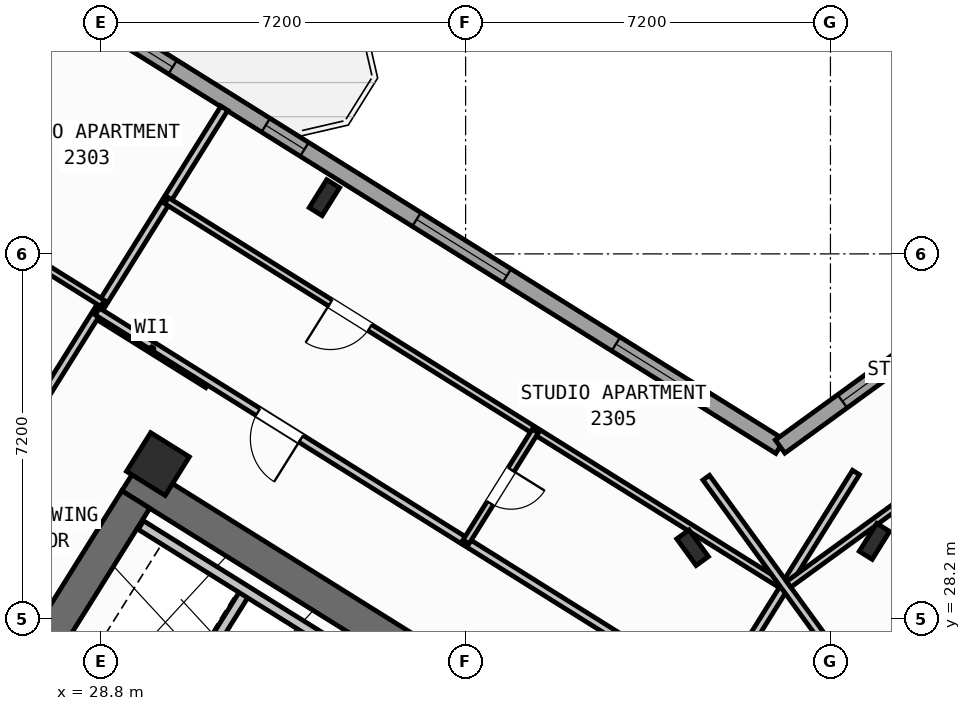
"""IFC4 building model, lengths in metres.
Left out: names, types, materials, properties, quantities, classifications, styles, units other than length and angle.
Written with IfcOpenShell. Run it as: python <this file> out.ifc"""

import sys

from ifc_helpers import new_model, si_unit, direction, frame, frame_2d, origin, origin_2d, place, context, subcontext, project, spatial, rectangle, hollow_rectangle, i_section, extrude, source, transform, mapped, element, fill, save


model = new_model("IFC4")
c1 = context("Model", 3, precision=1e-05, world=origin(), true_north=direction((0.0, 1.0)))
c2 = subcontext(c1, "Body", "Model", "MODEL_VIEW")
j1 = project(units=[si_unit("LENGTHUNIT", "METRE"), si_unit("PLANEANGLEUNIT", "RADIAN")], contexts=[c1])
p1 = place(None, origin())
s1 = spatial("IfcSite", under=j1, at=p1, CompositionType="ELEMENT")
p2 = place(p1, origin())
s2 = spatial("IfcBuilding", under=s1, at=p2, CompositionType="ELEMENT")
p3 = place(p2, frame((0.0, 0.0, 93.6)))
s3 = spatial("IfcBuildingStorey", under=s2, at=p3, CompositionType="ELEMENT", Elevation=93.6)
p4 = place(p3, frame((40.615, 23.983, 0.0), z_axis=(0.0, 0.0, 1.0), x_axis=(-0.848045953968, 0.529922692436, 0.0)))
e1 = element("IfcWall", 1, at=p4, inside=s3, PredefinedType="SHEAR", context=c2, shape_type="SweptSolid", body=[
    extrude(rectangle(XDim=13.24, YDim=0.65, at=frame_2d((6.62, 0.0))), origin(), (0.0, 0.0, 1.0), 3.35),
])
p5 = place(p3, frame((29.491, 30.552, 0.0), z_axis=(0.0, 0.0, 1.0), x_axis=(-0.529893103397, -0.8480644427, 0.0)))
e2 = element("IfcWall", 2, at=p5, inside=s3, PredefinedType="SHEAR", context=c2, shape_type="SweptSolid", body=[
    extrude(rectangle(XDim=3.525, YDim=0.65, at=frame_2d((1.763, 0.0))), origin(), (0.0, 0.0, 1.0), 3.35),
])
p6 = place(p3, frame((44.325, 24.113, 0.0), z_axis=(0.0, 0.0, 1.0), x_axis=(0.809012664862, 0.58779121131, 0.0)))
e3 = element("IfcWall", 3, at=p6, inside=s3, PredefinedType="SHEAR", context=c2, shape_type="SweptSolid", body=[
    extrude(rectangle(XDim=12.44, YDim=0.65, at=frame_2d((6.22, 0.0))), origin(), (0.0, 0.0, 1.0), 3.35),
])
m1 = source(origin(), c2, "Body", "SweptSolid", [
    extrude(i_section(OverallWidth=0.3, OverallDepth=0.65, WebThickness=0.016, FlangeThickness=0.031, at=origin_2d()), origin(), (0.0, 0.0, 1.0), 3.6),
])
for number, where, z_axis, x_axis in (
    (4, (44.068, 29.726, 0.0), (0.0, 0.0, 1.0), (-0.848, 0.53, 0.0)),
    (5, (33.213, 36.509, 0.0), (0.0, 0.0, 1.0), (-0.848, 0.53, 0.0)),
):
    element("IfcColumn", number, at=place(p3, frame(where, z_axis=z_axis, x_axis=x_axis)), inside=s3, PredefinedType="COLUMN", context=c2, shape_type="MappedRepresentation", body=[
        mapped(m1, transform((0.0, 0.0, 0.0), scale=1.0)),
    ])
m2 = source(origin(), c2, "Body", "SweptSolid", [
    extrude(hollow_rectangle(XDim=0.9, YDim=0.9, WallThickness=0.036, at=origin_2d()), origin(), (0.0, 0.0, 1.0), 3.6),
])
p7 = place(p3, frame((29.928, 31.251, 0.0), z_axis=(0.0, 0.0, 1.0), x_axis=(-0.848048096156, 0.529919264233, 0.0)))
e6 = element("IfcColumn", 6, at=p7, inside=s3, PredefinedType="COLUMN", context=c2, shape_type="MappedRepresentation", body=[
    mapped(m2, transform((0.0, 0.0, 0.0), scale=1.0)),
])
p8 = place(p3, frame((40.479, 29.601, 0.0), z_axis=(0.0, 0.0, 1.0), x_axis=(0.809016994375, 0.587785252292, 0.0)))
e7 = element("IfcColumn", 7, at=p8, inside=s3, PredefinedType="COLUMN", context=c2, shape_type="MappedRepresentation", body=[
    mapped(m1, transform((0.0, 0.0, 0.0), scale=1.0)),
])
p9 = place(p3, frame((31.76, 12.183, 0.0), z_axis=(0.0, 0.0, 1.0), x_axis=(-0.848047074256, 0.529920899612, 0.0)))
e8 = element("IfcWall", 8, at=p9, inside=s3, PredefinedType="STANDARD", context=c2, shape_type="SweptSolid", body=[
    extrude(rectangle(XDim=30.652, YDim=0.32, at=frame_2d((15.326, 0.0))), origin(), (0.0, 0.0, 1.0), 3.35),
])
p10 = place(p9, frame((15.153, 0.0, 0.0)))
e9 = element("IfcOpeningElement", 9, at=p10, cuts=e8, PredefinedType="OPENING", context=c2, shape_type="SweptSolid", body=[
    extrude(rectangle(XDim=1.2, YDim=2.15, at=frame_2d((0.6, 1.075))), frame((0.0, 0.17, 0.0), z_axis=(0.0, -1.0, 0.0), x_axis=(1.0, 0.0, 0.0)), (0.0, 0.0, 1.0), 0.34),
])
p11 = place(p9, frame((2.002, 0.0, 0.8)))
e10 = element("IfcOpeningElement", 10, at=p11, cuts=e8, PredefinedType="OPENING", context=c2, shape_type="SweptSolid", body=[
    extrude(rectangle(XDim=2.1, YDim=1.55, at=frame_2d((1.05, 0.775))), frame((0.0, 0.17, 0.0), z_axis=(0.0, -1.0, 0.0), x_axis=(1.0, 0.0, 0.0)), (0.0, 0.0, 1.0), 0.34),
])
p12 = place(p9, frame((7.206, 0.0, 0.8)))
e11 = element("IfcOpeningElement", 11, at=p12, cuts=e8, PredefinedType="OPENING", context=c2, shape_type="SweptSolid", body=[
    extrude(rectangle(XDim=2.1, YDim=1.55, at=frame_2d((1.05, 0.775))), frame((0.0, 0.17, 0.0), z_axis=(0.0, -1.0, 0.0), x_axis=(1.0, 0.0, 0.0)), (0.0, 0.0, 1.0), 0.34),
])
p13 = place(p9, frame((12.648, 0.0, 1.0)))
e12 = element("IfcOpeningElement", 12, at=p13, cuts=e8, PredefinedType="OPENING", context=c2, shape_type="SweptSolid", body=[
    extrude(rectangle(XDim=0.9, YDim=1.25, at=frame_2d((0.45, 0.625))), frame((0.0, 0.17, 0.0), z_axis=(0.0, -1.0, 0.0), x_axis=(1.0, 0.0, 0.0)), (0.0, 0.0, 1.0), 0.34),
])
p14 = place(p9, frame((27.974, 0.0, 0.95)))
e13 = element("IfcOpeningElement", 13, at=p14, cuts=e8, PredefinedType="OPENING", context=c2, shape_type="SweptSolid", body=[
    extrude(rectangle(XDim=1.2, YDim=1.4, at=frame_2d((0.6, 0.7))), frame((0.0, 0.17, 0.0), z_axis=(0.0, -1.0, 0.0), x_axis=(1.0, 0.0, 0.0)), (0.0, 0.0, 1.0), 0.34),
])
p15 = place(p9, frame((18.347, 0.0, 1.0)))
e14 = element("IfcOpeningElement", 14, at=p15, cuts=e8, PredefinedType="OPENING", context=c2, shape_type="SweptSolid", body=[
    extrude(rectangle(XDim=0.9, YDim=1.25, at=frame_2d((0.45, 0.625))), frame((0.0, 0.17, 0.0), z_axis=(0.0, -1.0, 0.0), x_axis=(1.0, 0.0, 0.0)), (0.0, 0.0, 1.0), 0.34),
])
p16 = place(p9, frame((20.931, 0.0, 1.0)))
e15 = element("IfcOpeningElement", 15, at=p16, cuts=e8, PredefinedType="OPENING", context=c2, shape_type="SweptSolid", body=[
    extrude(rectangle(XDim=0.65, YDim=1.15, at=frame_2d((0.325, 0.575))), frame((0.0, 0.17, 0.0), z_axis=(0.0, -1.0, 0.0), x_axis=(1.0, 0.0, 0.0)), (0.0, 0.0, 1.0), 0.34),
])
p17 = place(p9, frame((22.938, 0.0, 1.0)))
e16 = element("IfcOpeningElement", 16, at=p17, cuts=e8, PredefinedType="OPENING", context=c2, shape_type="SweptSolid", body=[
    extrude(rectangle(XDim=0.9, YDim=1.25, at=frame_2d((0.45, 0.625))), frame((0.0, 0.17, 0.0), z_axis=(0.0, -1.0, 0.0), x_axis=(1.0, 0.0, 0.0)), (0.0, 0.0, 1.0), 0.34),
])
p18 = place(p9, frame((25.069, 0.0, 1.0)))
e17 = element("IfcOpeningElement", 17, at=p18, cuts=e8, PredefinedType="OPENING", context=c2, shape_type="SweptSolid", body=[
    extrude(rectangle(XDim=0.9, YDim=1.25, at=frame_2d((0.45, 0.625))), frame((0.0, 0.17, 0.0), z_axis=(0.0, -1.0, 0.0), x_axis=(1.0, 0.0, 0.0)), (0.0, 0.0, 1.0), 0.34),
])
p19 = place(p3, frame((17.424, 47.083, 0.0), z_axis=(0.0, 0.0, 1.0), x_axis=(0.848049927979, -0.529916332693, 0.0)))
e18 = element("IfcWall", 18, at=p19, inside=s3, PredefinedType="STANDARD", context=c2, shape_type="SweptSolid", body=[
    extrude(rectangle(XDim=29.223, YDim=0.32, at=frame_2d((14.612, 0.0))), origin(), (0.0, 0.0, 1.0), 3.35),
])
p20 = place(p19, frame((3.745, 0.0, 0.0)))
e19 = element("IfcOpeningElement", 19, at=p20, cuts=e18, PredefinedType="OPENING", context=c2, shape_type="SweptSolid", body=[
    extrude(rectangle(XDim=1.05, YDim=2.15, at=frame_2d((0.525, 1.075))), frame((0.0, 0.17, 0.0), z_axis=(0.0, -1.0, 0.0), x_axis=(1.0, 0.0, 0.0)), (0.0, 0.0, 1.0), 0.34),
])
p21 = place(p19, frame((0.699, 0.0, 0.95)))
e20 = element("IfcOpeningElement", 20, at=p21, cuts=e18, PredefinedType="OPENING", context=c2, shape_type="SweptSolid", body=[
    extrude(rectangle(XDim=1.2, YDim=1.4, at=frame_2d((0.6, 0.7))), frame((0.0, 0.17, 0.0), z_axis=(0.0, -1.0, 0.0), x_axis=(1.0, 0.0, 0.0)), (0.0, 0.0, 1.0), 0.34),
])
p22 = place(p19, frame((6.951, 0.0, 1.0)))
e21 = element("IfcOpeningElement", 21, at=p22, cuts=e18, PredefinedType="OPENING", context=c2, shape_type="SweptSolid", body=[
    extrude(rectangle(XDim=0.9, YDim=1.25, at=frame_2d((0.45, 0.625))), frame((0.0, 0.17, 0.0), z_axis=(0.0, -1.0, 0.0), x_axis=(1.0, 0.0, 0.0)), (0.0, 0.0, 1.0), 0.34),
])
p23 = place(p19, frame((9.841, 0.0, 0.85)))
e22 = element("IfcOpeningElement", 22, at=p23, cuts=e18, PredefinedType="OPENING", context=c2, shape_type="SweptSolid", body=[
    extrude(rectangle(XDim=1.5, YDim=1.5, at=frame_2d((0.75, 0.75))), frame((0.0, 0.17, 0.0), z_axis=(0.0, -1.0, 0.0), x_axis=(1.0, 0.0, 0.0)), (0.0, 0.0, 1.0), 0.34),
])
p24 = place(p19, frame((13.889, 0.0, 0.95)))
e23 = element("IfcOpeningElement", 23, at=p24, cuts=e18, PredefinedType="OPENING", context=c2, shape_type="SweptSolid", body=[
    extrude(rectangle(XDim=1.2, YDim=1.4, at=frame_2d((0.6, 0.7))), frame((0.0, 0.17, 0.0), z_axis=(0.0, -1.0, 0.0), x_axis=(1.0, 0.0, 0.0)), (0.0, 0.0, 1.0), 0.34),
])
p25 = place(p19, frame((17.254, 0.0, 1.0)))
e24 = element("IfcOpeningElement", 24, at=p25, cuts=e18, PredefinedType="OPENING", context=c2, shape_type="SweptSolid", body=[
    extrude(rectangle(XDim=0.9, YDim=1.25, at=frame_2d((0.45, 0.625))), frame((0.0, 0.17, 0.0), z_axis=(0.0, -1.0, 0.0), x_axis=(1.0, 0.0, 0.0)), (0.0, 0.0, 1.0), 0.34),
])
p26 = place(p19, frame((20.764, 0.0, 0.8)))
e25 = element("IfcOpeningElement", 25, at=p26, cuts=e18, PredefinedType="OPENING", context=c2, shape_type="SweptSolid", body=[
    extrude(rectangle(XDim=2.1, YDim=1.55, at=frame_2d((1.05, 0.775))), frame((0.0, 0.17, 0.0), z_axis=(0.0, -1.0, 0.0), x_axis=(1.0, 0.0, 0.0)), (0.0, 0.0, 1.0), 0.34),
])
p27 = place(p19, frame((25.403, 0.0, 0.8)))
e26 = element("IfcOpeningElement", 26, at=p27, cuts=e18, PredefinedType="OPENING", context=c2, shape_type="SweptSolid", body=[
    extrude(rectangle(XDim=2.1, YDim=1.55, at=frame_2d((1.05, 0.775))), frame((0.0, 0.17, 0.0), z_axis=(0.0, -1.0, 0.0), x_axis=(1.0, 0.0, 0.0)), (0.0, 0.0, 1.0), 0.34),
])
p28 = place(p3, frame((42.207, 31.597, 0.0), z_axis=(0.0, 0.0, 1.0), x_axis=(0.809020333377, 0.587780656523, 0.0)))
e27 = element("IfcWall", 27, at=p28, inside=s3, PredefinedType="STANDARD", context=c2, shape_type="SweptSolid", body=[
    extrude(rectangle(XDim=15.223, YDim=0.32, at=frame_2d((7.611, 0.0))), origin(), (0.0, 0.0, 1.0), 3.35),
])
p29 = place(p28, frame((12.82, 0.0, 0.0)))
e28 = element("IfcOpeningElement", 28, at=p29, cuts=e27, PredefinedType="OPENING", context=c2, shape_type="SweptSolid", body=[
    extrude(rectangle(XDim=1.05, YDim=2.15, at=frame_2d((0.525, 1.075))), frame((0.0, 0.17, 0.0), z_axis=(0.0, -1.0, 0.0), x_axis=(1.0, 0.0, 0.0)), (0.0, 0.0, 1.0), 0.34),
])
p30 = place(p28, frame((1.52, 0.0, 0.8)))
e29 = element("IfcOpeningElement", 29, at=p30, cuts=e27, PredefinedType="OPENING", context=c2, shape_type="SweptSolid", body=[
    extrude(rectangle(XDim=2.1, YDim=1.55, at=frame_2d((1.05, 0.775))), frame((0.0, 0.17, 0.0), z_axis=(0.0, -1.0, 0.0), x_axis=(1.0, 0.0, 0.0)), (0.0, 0.0, 1.0), 0.34),
])
p31 = place(p28, frame((5.76, 0.0, 0.8)))
e30 = element("IfcOpeningElement", 30, at=p31, cuts=e27, PredefinedType="OPENING", context=c2, shape_type="SweptSolid", body=[
    extrude(rectangle(XDim=2.1, YDim=1.55, at=frame_2d((1.05, 0.775))), frame((0.0, 0.17, 0.0), z_axis=(0.0, -1.0, 0.0), x_axis=(1.0, 0.0, 0.0)), (0.0, 0.0, 1.0), 0.34),
])
p32 = place(p28, frame((10.219, 0.0, 1.0)))
e31 = element("IfcOpeningElement", 31, at=p32, cuts=e27, PredefinedType="OPENING", context=c2, shape_type="SweptSolid", body=[
    extrude(rectangle(XDim=0.9, YDim=1.25, at=frame_2d((0.45, 0.625))), frame((0.0, 0.17, 0.0), z_axis=(0.0, -1.0, 0.0), x_axis=(1.0, 0.0, 0.0)), (0.0, 0.0, 1.0), 0.34),
])
p33 = place(p3, frame((31.645, 28.716, 0.0), z_axis=(0.0, 0.0, 1.0), x_axis=(-0.52986693015, -0.848080795876, 0.0)))
e32 = element("IfcWall", 32, at=p33, inside=s3, PredefinedType="STANDARD", context=c2, shape_type="SweptSolid", body=[
    extrude(rectangle(XDim=2.66, YDim=0.2, at=frame_2d((1.33, 0.0))), origin(), (0.0, 0.0, 1.0), 3.34),
])
p34 = place(p3, frame((33.363, 27.69, 0.0), z_axis=(0.0, 0.0, 1.0), x_axis=(-0.848053806312, 0.529910125964, 0.0)))
e33 = element("IfcWall", 33, at=p34, inside=s3, PredefinedType="STANDARD", context=c2, shape_type="SweptSolid", body=[
    extrude(rectangle(XDim=4.448, YDim=0.2, at=frame_2d((2.224, 0.0))), origin(), (0.0, 0.0, 1.0), 3.34),
])
p35 = place(p3, frame((30.914, 32.829, 0.0), z_axis=(0.0, 0.0, 1.0), x_axis=(-0.848008813643, 0.529982124211, 0.0)))
e34 = element("IfcWall", 34, at=p35, inside=s3, PredefinedType="PARTITIONING", context=c2, shape_type="SweptSolid", body=[
    extrude(rectangle(XDim=2.61, YDim=0.16, at=frame_2d((1.305, 0.0))), origin(), (0.0, 0.0, 1.0), 3.34),
])
p36 = place(p3, frame((31.239, 38.274, 0.0), z_axis=(0.0, 0.0, 1.0), x_axis=(-0.529928058306, -0.848042600947, 0.0)))
e35 = element("IfcWall", 35, at=p36, inside=s3, PredefinedType="PARTITIONING", context=c2, shape_type="SweptSolid", body=[
    extrude(rectangle(XDim=8.05, YDim=0.16, at=frame_2d((4.025, 0.0))), origin(), (0.0, 0.0, 1.0), 3.34),
])
p37 = place(p3, frame((28.833, 34.424, 0.0), z_axis=(0.0, 0.0, 1.0), x_axis=(-0.848059820872, 0.529900500304, 0.0)))
e36 = element("IfcWall", 36, at=p37, inside=s3, PredefinedType="PLUMBINGWALL", context=c2, shape_type="SweptSolid", body=[
    extrude(rectangle(XDim=3.79, YDim=0.14, at=frame_2d((1.895, 0.0))), origin(), (0.0, 0.0, 1.0), 3.34),
])
p38 = place(p37, frame((2.23, 0.0, 0.0)))
e37 = element("IfcOpeningElement", 37, at=p38, cuts=e36, PredefinedType="OPENING", context=c2, shape_type="SweptSolid", body=[
    extrude(rectangle(XDim=0.92, YDim=2.08, at=frame_2d((0.46, 1.04))), frame((0.0, 0.08, 0.0), z_axis=(0.0, -1.0, 0.0), x_axis=(1.0, 0.0, 0.0)), (0.0, 0.0, 1.0), 0.16),
])
p39 = place(p3, frame((41.936, 26.012, 0.0), z_axis=(0.0, 0.0, 1.0), x_axis=(-0.848051154596, 0.529914369676, 0.0)))
e38 = element("IfcWall", 38, at=p39, inside=s3, PredefinedType="PARTITIONING", context=c2, shape_type="SweptSolid", body=[
    extrude(rectangle(XDim=15.57, YDim=0.16, at=frame_2d((7.785, 0.0))), origin(), (0.0, 0.0, 1.0), 3.34),
])
p40 = place(p39, frame((10.83, 0.0, 0.0)))
e39 = element("IfcOpeningElement", 39, at=p40, cuts=e38, PredefinedType="OPENING", context=c2, shape_type="SweptSolid", body=[
    extrude(rectangle(XDim=1.0, YDim=2.1, at=frame_2d((0.5, 1.05))), frame((0.0, 0.09, 0.0), z_axis=(0.0, -1.0, 0.0), x_axis=(1.0, 0.0, 0.0)), (0.0, 0.0, 1.0), 0.18),
])
p41 = place(p3, frame((43.704, 31.086, 0.0), z_axis=(0.0, 0.0, 1.0), x_axis=(-0.529906828443, -0.848055866774, 0.0)))
e40 = element("IfcWall", 40, at=p41, inside=s3, PredefinedType="PARTITIONING", context=c2, shape_type="SweptSolid", body=[
    extrude(rectangle(XDim=5.48, YDim=0.16, at=frame_2d((2.74, 0.0))), origin(), (0.0, 0.0, 1.0), 3.34),
])
p42 = place(p3, frame((42.226, 28.873, 0.0), z_axis=(0.0, 0.0, 1.0), x_axis=(-0.848049134363, 0.529917602752, 0.0)))
e41 = element("IfcWall", 41, at=p42, inside=s3, PredefinedType="PLUMBINGWALL", context=c2, shape_type="SweptSolid", body=[
    extrude(rectangle(XDim=14.3, YDim=0.14, at=frame_2d((7.15, 0.0))), origin(), (0.0, 0.0, 1.0), 3.34),
])
p43 = place(p42, frame((9.57, 0.0, 0.0)))
e42 = element("IfcOpeningElement", 42, at=p43, cuts=e41, PredefinedType="OPENING", context=c2, shape_type="SweptSolid", body=[
    extrude(rectangle(XDim=0.92, YDim=2.08, at=frame_2d((0.46, 1.04))), frame((0.0, 0.08, 0.0), z_axis=(0.0, -1.0, 0.0), x_axis=(1.0, 0.0, 0.0)), (0.0, 0.0, 1.0), 0.16),
])
p44 = place(p3, frame((37.375, 31.904, 0.0), z_axis=(0.0, 0.0, 1.0), x_axis=(-0.529913878929, -0.848051461244, 0.0)))
e43 = element("IfcWall", 43, at=p44, inside=s3, PredefinedType="PLUMBINGWALL", context=c2, shape_type="SweptSolid", body=[
    extrude(rectangle(XDim=2.58, YDim=0.14, at=frame_2d((1.29, 0.0))), origin(), (0.0, 0.0, 1.0), 3.34),
])
p45 = place(p44, frame((0.9, 0.0, 0.0)))
e44 = element("IfcOpeningElement", 44, at=p45, cuts=e43, PredefinedType="OPENING", context=c2, shape_type="SweptSolid", body=[
    extrude(rectangle(XDim=0.78, YDim=2.05, at=frame_2d((0.39, 1.025))), frame((0.0, 0.08, 0.0), z_axis=(0.0, -1.0, 0.0), x_axis=(1.0, 0.0, 0.0)), (0.0, 0.0, 1.0), 0.16),
])
p46 = place(p3, frame((42.866, 26.044, 0.0), z_axis=(0.0, 0.0, 1.0), x_axis=(0.809020254154, 0.587780765566, 0.0)))
e45 = element("IfcWall", 45, at=p46, inside=s3, PredefinedType="PARTITIONING", context=c2, shape_type="SweptSolid", body=[
    extrude(rectangle(XDim=14.67, YDim=0.16, at=frame_2d((7.335, 0.0))), origin(), (0.0, 0.0, 1.0), 3.34),
])
p47 = place(p46, frame((10.2, 0.0, 0.0)))
e46 = element("IfcOpeningElement", 46, at=p47, cuts=e45, PredefinedType="OPENING", context=c2, shape_type="SweptSolid", body=[
    extrude(rectangle(XDim=1.0, YDim=2.1, at=frame_2d((0.5, 1.05))), frame((0.0, 0.09, 0.0), z_axis=(0.0, -1.0, 0.0), x_axis=(1.0, 0.0, 0.0)), (0.0, 0.0, 1.0), 0.18),
])
p48 = place(p3, frame((43.969, 26.55, 0.0), z_axis=(0.0, 0.0, 1.0), x_axis=(-0.587776919386, 0.80902304852, 0.0)))
e47 = element("IfcWall", 47, at=p48, inside=s3, PredefinedType="PARTITIONING", context=c2, shape_type="SweptSolid", body=[
    extrude(rectangle(XDim=5.48, YDim=0.16, at=frame_2d((2.74, 0.0))), origin(), (0.0, 0.0, 1.0), 3.34),
])
p49 = place(p3, frame((42.377, 28.878, 0.0), z_axis=(0.0, 0.0, 1.0), x_axis=(0.809020411523, 0.587780548963, 0.0)))
e48 = element("IfcWall", 48, at=p49, inside=s3, PredefinedType="PLUMBINGWALL", context=c2, shape_type="SweptSolid", body=[
    extrude(rectangle(XDim=13.4, YDim=0.14, at=frame_2d((6.7, 0.0))), origin(), (0.0, 0.0, 1.0), 3.34),
])
p50 = place(p49, frame((8.94, 0.0, 0.0)))
e49 = element("IfcOpeningElement", 49, at=p50, cuts=e48, PredefinedType="OPENING", context=c2, shape_type="SweptSolid", body=[
    extrude(rectangle(XDim=0.92, YDim=2.08, at=frame_2d((0.46, 1.04))), frame((0.0, 0.08, 0.0), z_axis=(0.0, -1.0, 0.0), x_axis=(1.0, 0.0, 0.0)), (0.0, 0.0, 1.0), 0.16),
])
m3 = source(origin(), c2, "Body", "SweptSolid", [
    extrude(rectangle(XDim=1.2, YDim=1.4, at=frame_2d((0.6, 0.7))), frame((0.0, 0.03, 0.0), z_axis=(0.0, -1.0, 0.0), x_axis=(1.0, 0.0, 0.0)), (0.0, 0.0, 1.0), 0.06),
])
p51 = place(p24, origin())
e50 = element("IfcWindow", 50, at=p51, inside=s3, PartitioningType="SINGLE_PANEL", PredefinedType="WINDOW", context=c2, shape_type="MappedRepresentation", body=[
    mapped(m3, transform((0.0, 0.0, 0.0), scale=1.0)),
])
fill(e23, e50)
m4 = source(origin(), c2, "Body", "SweptSolid", [
    extrude(rectangle(XDim=0.9, YDim=1.25, at=frame_2d((0.45, 0.625))), frame((0.0, 0.03, 0.0), z_axis=(0.0, -1.0, 0.0), x_axis=(1.0, 0.0, 0.0)), (0.0, 0.0, 1.0), 0.06),
])
p52 = place(p25, origin())
e51 = element("IfcWindow", 51, at=p52, inside=s3, PartitioningType="SINGLE_PANEL", PredefinedType="WINDOW", context=c2, shape_type="MappedRepresentation", body=[
    mapped(m4, transform((0.0, 0.0, 0.0), scale=1.0)),
])
fill(e24, e51)
m5 = source(origin(), c2, "Body", "SweptSolid", [
    extrude(rectangle(XDim=2.1, YDim=1.55, at=frame_2d((1.05, 0.775))), frame((0.0, 0.03, 0.0), z_axis=(0.0, -1.0, 0.0), x_axis=(1.0, 0.0, 0.0)), (0.0, 0.0, 1.0), 0.06),
])
p53 = place(p26, origin())
e52 = element("IfcWindow", 52, at=p53, inside=s3, PartitioningType="SINGLE_PANEL", PredefinedType="WINDOW", context=c2, shape_type="MappedRepresentation", body=[
    mapped(m5, transform((0.0, 0.0, 0.0), scale=1.0)),
])
fill(e25, e52)
p54 = place(p27, origin())
e53 = element("IfcWindow", 53, at=p54, inside=s3, PartitioningType="SINGLE_PANEL", PredefinedType="WINDOW", context=c2, shape_type="MappedRepresentation", body=[
    mapped(m5, transform((0.0, 0.0, 0.0), scale=1.0)),
])
fill(e26, e53)
p55 = place(p30, origin())
e54 = element("IfcWindow", 54, at=p55, inside=s3, PartitioningType="SINGLE_PANEL", PredefinedType="WINDOW", context=c2, shape_type="MappedRepresentation", body=[
    mapped(m5, transform((0.0, 0.0, 0.0), scale=1.0)),
])
fill(e29, e54)
m6 = source(origin(), c2, "Body", "SweptSolid", [
    extrude(rectangle(XDim=1.0, YDim=2.1, at=frame_2d((0.5, 1.05))), frame((0.0, 0.025, 0.0), z_axis=(0.0, -1.0, 0.0), x_axis=(1.0, 0.0, 0.0)), (0.0, 0.0, 1.0), 0.05),
])
p56 = place(p40, origin())
e55 = element("IfcDoor", 55, at=p56, inside=s3, OperationType="SINGLE_SWING_LEFT", PredefinedType="DOOR", context=c2, shape_type="MappedRepresentation", body=[
    mapped(m6, transform((0.0, 0.0, 0.0), scale=1.0)),
])
fill(e39, e55)
m7 = source(origin(), c2, "Body", "SweptSolid", [
    extrude(rectangle(XDim=0.92, YDim=2.08, at=frame_2d((0.46, 1.04))), frame((0.0, 0.025, 0.0), z_axis=(0.0, -1.0, 0.0), x_axis=(1.0, 0.0, 0.0)), (0.0, 0.0, 1.0), 0.05),
])
p57 = place(p43, origin())
e56 = element("IfcDoor", 56, at=p57, inside=s3, OperationType="SINGLE_SWING_RIGHT", PredefinedType="DOOR", context=c2, shape_type="MappedRepresentation", body=[
    mapped(m7, transform((0.0, 0.0, 0.0), scale=1.0)),
])
fill(e42, e56)
m8 = source(origin(), c2, "Body", "SweptSolid", [
    extrude(rectangle(XDim=0.78, YDim=2.05, at=frame_2d((0.39, 1.025))), frame((0.0, 0.025, 0.0), z_axis=(0.0, -1.0, 0.0), x_axis=(1.0, 0.0, 0.0)), (0.0, 0.0, 1.0), 0.05),
])
p58 = place(p45, origin())
e57 = element("IfcDoor", 57, at=p58, inside=s3, OperationType="SINGLE_SWING_LEFT", PredefinedType="DOOR", context=c2, shape_type="MappedRepresentation", body=[
    mapped(m8, transform((0.0, 0.0, 0.0), scale=1.0)),
])
fill(e44, e57)
save(model, sys.argv[1])
